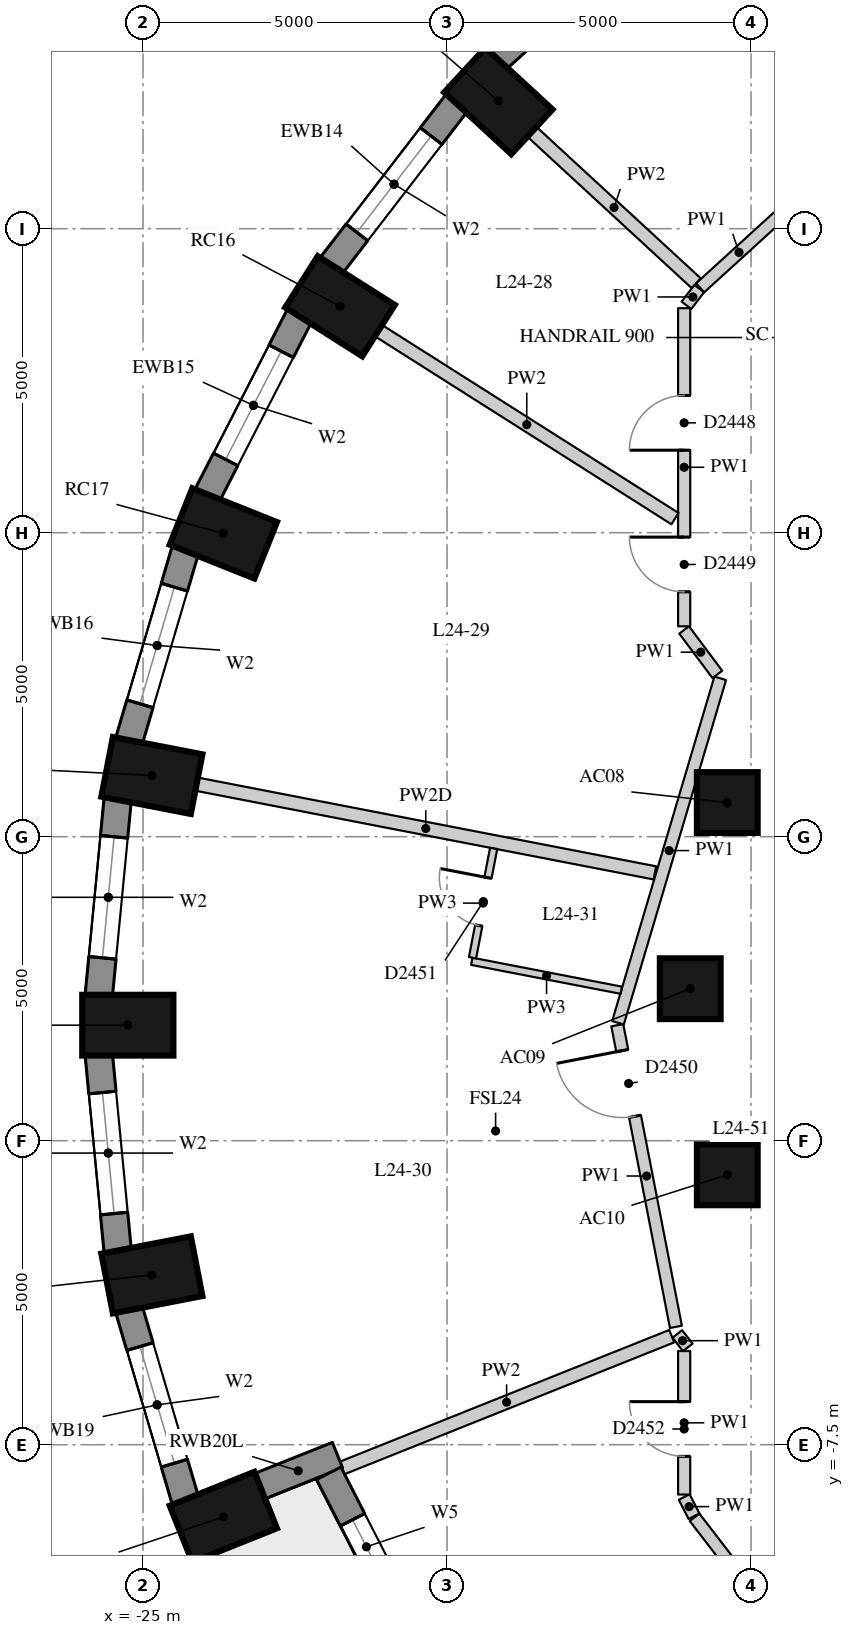
"""IFC4 building model, lengths in metres.
Left out: names, types, materials, properties, quantities, classifications, styles, units other than length and angle.
Written with IfcOpenShell. Run it as: python <this file> out.ifc"""

import sys

from ifc_helpers import new_model, si_unit, direction, frame, frame_2d, origin, origin_2d, place, context, subcontext, project, spatial, rectangle, extrude, element, fill, save


model = new_model("IFC4")
c1 = context("Model", 3, precision=1e-05, world=origin(), true_north=direction((0.0, 1.0)))
c2 = subcontext(c1, "Body", "Model", "MODEL_VIEW")
j1 = project(units=[si_unit("LENGTHUNIT", "METRE"), si_unit("PLANEANGLEUNIT", "RADIAN")], contexts=[c1])
p1 = place(None, origin())
s1 = spatial("IfcSite", under=j1, at=p1, CompositionType="ELEMENT")
p2 = place(p1, origin())
s2 = spatial("IfcBuilding", under=s1, at=p2, CompositionType="ELEMENT")
p3 = place(p2, frame((0.0, 0.0, 88.9)))
s3 = spatial("IfcBuildingStorey", under=s2, at=p3, CompositionType="ELEMENT", Elevation=88.9)
for number, where, z_axis, x_axis in (
    (1, (-19.156, 14.602, 0.0), (0.0, 0.0, 1.0), (-0.735, 0.678, 0.0)),
    (2, (-21.76, 11.225, 0.0), (0.0, 0.0, 1.0), (-0.845, 0.536, 0.0)),
    (3, (-23.679, 7.489, 0.0), (0.0, 0.0, 1.0), (-0.929, 0.371, 0.0)),
    (4, (-24.854, 3.507, 0.0), (0.0, 0.0, 1.0), (-0.982, 0.19, 0.0)),
    (5, (-25.25, -0.6, 0.0), (0.0, 0.0, 1.0), (-1.0, 0.0, 0.0)),
    (6, (-24.854, -4.707, 0.0), (0.0, 0.0, 1.0), (-0.982, -0.19, 0.0)),
    (7, (-23.679, -8.689, 0.0), (0.0, 0.0, 1.0), (-0.929, -0.371, 0.0)),
):
    element("IfcColumn", number, at=place(p3, frame(where, z_axis=z_axis, x_axis=x_axis)), inside=s3, PredefinedType="COLUMN", context=c2, shape_type="SweptSolid", body=[
        extrude(rectangle(XDim=1.5, YDim=1.0, at=origin_2d()), origin(), (0.0, 0.0, 1.0), 3.3),
    ])
for number, where, z_axis, x_axis in (
    (8, (-15.391, 3.062, 0.0), (0.0, 0.0, 1.0), (1.0, 0.0, 0.0)),
    (9, (-16.0, 0.0, 0.0), (0.0, 0.0, 1.0), (1.0, 0.0, 0.0)),
    (10, (-15.391, -3.062, 0.0), (0.0, 0.0, 1.0), (1.0, 0.0, 0.0)),
):
    element("IfcColumn", number, at=place(p3, frame(where, z_axis=z_axis, x_axis=x_axis)), inside=s3, PredefinedType="COLUMN", context=c2, shape_type="SweptSolid", body=[
        extrude(rectangle(XDim=1.0, YDim=1.0, at=origin_2d()), origin(), (0.0, 0.0, 1.0), 3.3),
    ])
p4 = place(p3, frame((-16.62, 17.61, 0.0), z_axis=(0.0, 0.0, 1.0), x_axis=(-0.74032902847, -0.672244694739, 0.0)))
e11 = element("IfcWall", 11, at=p4, inside=s3, PredefinedType="SOLIDWALL", context=c2, shape_type="SweptSolid", body=[
    extrude(rectangle(XDim=3.464, YDim=0.45, at=frame_2d((1.732, 0.0))), origin(), (0.0, 0.0, 1.0), 3.02),
])
p5 = place(p4, frame((0.732, 0.0, 0.4)))
e12 = element("IfcOpeningElement", 12, at=p5, cuts=e11, PredefinedType="OPENING", context=c2, shape_type="SweptSolid", body=[
    extrude(rectangle(XDim=2.0, YDim=1.75, at=frame_2d((1.0, 0.875))), frame((0.0, 0.235, 0.0), z_axis=(0.0, -1.0, 0.0), x_axis=(1.0, 0.0, 0.0)), (0.0, 0.0, 1.0), 0.47),
])
p6 = place(p3, frame((-19.835, 14.575, 0.0), z_axis=(0.0, 0.0, 1.0), x_axis=(-0.610693945156, -0.791866721961, 0.0)))
e13 = element("IfcWall", 13, at=p6, inside=s3, PredefinedType="SOLIDWALL", context=c2, shape_type="SweptSolid", body=[
    extrude(rectangle(XDim=3.395, YDim=0.45, at=frame_2d((1.697, 0.0))), origin(), (0.0, 0.0, 1.0), 3.02),
])
p7 = place(p6, frame((0.697, 0.0, 0.4)))
e14 = element("IfcOpeningElement", 14, at=p7, cuts=e13, PredefinedType="OPENING", context=c2, shape_type="SweptSolid", body=[
    extrude(rectangle(XDim=2.0, YDim=1.75, at=frame_2d((1.0, 0.875))), frame((0.0, 0.235, 0.0), z_axis=(0.0, -1.0, 0.0), x_axis=(1.0, 0.0, 0.0)), (0.0, 0.0, 1.0), 0.47),
])
p8 = place(p3, frame((-22.423, 11.077, 0.0), z_axis=(0.0, 0.0, 1.0), x_axis=(-0.456828186229, -0.889554949549, 0.0)))
e15 = element("IfcWall", 15, at=p8, inside=s3, PredefinedType="SOLIDWALL", context=c2, shape_type="SweptSolid", body=[
    extrude(rectangle(XDim=3.333, YDim=0.45, at=frame_2d((1.667, 0.0))), origin(), (0.0, 0.0, 1.0), 3.02),
])
p9 = place(p8, frame((0.666, 0.0, 0.4)))
e16 = element("IfcOpeningElement", 16, at=p9, cuts=e15, PredefinedType="OPENING", context=c2, shape_type="SweptSolid", body=[
    extrude(rectangle(XDim=2.0, YDim=1.75, at=frame_2d((1.0, 0.875))), frame((0.0, 0.235, 0.0), z_axis=(0.0, -1.0, 0.0), x_axis=(1.0, 0.0, 0.0)), (0.0, 0.0, 1.0), 0.47),
])
p10 = place(p3, frame((-24.302, 7.221, 0.0), z_axis=(0.0, 0.0, 1.0), x_axis=(-0.283071248438, -0.959098883488, 0.0)))
e17 = element("IfcWall", 17, at=p10, inside=s3, PredefinedType="SOLIDWALL", context=c2, shape_type="SweptSolid", body=[
    extrude(rectangle(XDim=3.286, YDim=0.45, at=frame_2d((1.643, 0.0))), origin(), (0.0, 0.0, 1.0), 3.02),
])
p11 = place(p10, frame((0.643, 0.0, 0.4)))
e18 = element("IfcOpeningElement", 18, at=p11, cuts=e17, PredefinedType="OPENING", context=c2, shape_type="SweptSolid", body=[
    extrude(rectangle(XDim=2.0, YDim=1.75, at=frame_2d((1.0, 0.875))), frame((0.0, 0.235, 0.0), z_axis=(0.0, -1.0, 0.0), x_axis=(1.0, 0.0, 0.0)), (0.0, 0.0, 1.0), 0.47),
])
p12 = place(p3, frame((-25.415, 3.126, 0.0), z_axis=(0.0, 0.0, 1.0), x_axis=(-0.095967726544, -0.995384446062, 0.0)))
e19 = element("IfcWall", 19, at=p12, inside=s3, PredefinedType="SOLIDWALL", context=c2, shape_type="SweptSolid", body=[
    extrude(rectangle(XDim=3.261, YDim=0.45, at=frame_2d((1.631, 0.0))), origin(), (0.0, 0.0, 1.0), 3.02),
])
p13 = place(p12, frame((0.631, 0.0, 0.4)))
e20 = element("IfcOpeningElement", 20, at=p13, cuts=e19, PredefinedType="OPENING", context=c2, shape_type="SweptSolid", body=[
    extrude(rectangle(XDim=2.0, YDim=1.75, at=frame_2d((1.0, 0.875))), frame((0.0, 0.235, 0.0), z_axis=(0.0, -1.0, 0.0), x_axis=(1.0, 0.0, 0.0)), (0.0, 0.0, 1.0), 0.47),
])
p14 = place(p3, frame((-25.728, -1.08, 0.0), z_axis=(0.0, 0.0, 1.0), x_axis=(0.095967726544, -0.995384446062, 0.0)))
e21 = element("IfcWall", 21, at=p14, inside=s3, PredefinedType="SOLIDWALL", context=c2, shape_type="SweptSolid", body=[
    extrude(rectangle(XDim=3.261, YDim=0.45, at=frame_2d((1.631, 0.0))), origin(), (0.0, 0.0, 1.0), 3.02),
])
p15 = place(p14, frame((0.631, 0.0, 0.4)))
e22 = element("IfcOpeningElement", 22, at=p15, cuts=e21, PredefinedType="OPENING", context=c2, shape_type="SweptSolid", body=[
    extrude(rectangle(XDim=2.0, YDim=1.75, at=frame_2d((1.0, 0.875))), frame((0.0, 0.235, 0.0), z_axis=(0.0, -1.0, 0.0), x_axis=(1.0, 0.0, 0.0)), (0.0, 0.0, 1.0), 0.47),
])
p16 = place(p3, frame((-25.232, -5.269, 0.0), z_axis=(0.0, 0.0, 1.0), x_axis=(0.283051078697, -0.959104836214, 0.0)))
e23 = element("IfcWall", 23, at=p16, inside=s3, PredefinedType="SOLIDWALL", context=c2, shape_type="SweptSolid", body=[
    extrude(rectangle(XDim=3.286, YDim=0.45, at=frame_2d((1.643, 0.0))), origin(), (0.0, 0.0, 1.0), 3.02),
])
p17 = place(p16, frame((0.643, 0.0, 0.4)))
e24 = element("IfcOpeningElement", 24, at=p17, cuts=e23, PredefinedType="OPENING", context=c2, shape_type="SweptSolid", body=[
    extrude(rectangle(XDim=2.0, YDim=1.75, at=frame_2d((1.0, 0.875))), frame((0.0, 0.235, 0.0), z_axis=(0.0, -1.0, 0.0), x_axis=(1.0, 0.0, 0.0)), (0.0, 0.0, 1.0), 0.47),
])
p18 = place(p3, frame((-23.093, -8.187, 0.0), z_axis=(0.0, 0.0, 1.0), x_axis=(0.928549333349, 0.371209018665, 0.0)))
e25 = element("IfcWall", 25, at=p18, inside=s3, PredefinedType="SOLIDWALL", context=c2, shape_type="SweptSolid", body=[
    extrude(rectangle(XDim=1.39, YDim=0.45, at=frame_2d((0.695, 0.0))), origin(), (0.0, 0.0, 1.0), 3.02),
])
p19 = place(p3, frame((-21.945, -7.97, 0.0), z_axis=(0.0, 0.0, 1.0), x_axis=(0.455905146579, -0.89002836883, 0.0)))
e26 = element("IfcWall", 26, at=p19, inside=s3, PredefinedType="SOLIDWALL", context=c2, shape_type="SweptSolid", body=[
    extrude(rectangle(XDim=3.867, YDim=0.45, at=frame_2d((1.934, 0.0))), origin(), (0.0, 0.0, 1.0), 3.02),
])
p20 = place(p19, frame((0.858, 0.0, 0.4)))
e27 = element("IfcOpeningElement", 27, at=p20, cuts=e26, PredefinedType="OPENING", context=c2, shape_type="SweptSolid", body=[
    extrude(rectangle(XDim=1.0, YDim=1.75, at=frame_2d((0.5, 0.875))), frame((0.0, 0.235, 0.0), z_axis=(0.0, -1.0, 0.0), x_axis=(1.0, 0.0, 0.0)), (0.0, 0.0, 1.0), 0.47),
])
p21 = place(p19, frame((2.009, 0.0, 0.0)))
e28 = element("IfcOpeningElement", 28, at=p21, cuts=e26, PredefinedType="OPENING", context=c2, shape_type="SweptSolid", body=[
    extrude(rectangle(XDim=1.0, YDim=2.15, at=frame_2d((0.5, 1.075))), frame((0.0, 0.235, 0.0), z_axis=(0.0, -1.0, 0.0), x_axis=(1.0, 0.0, 0.0)), (0.0, 0.0, 1.0), 0.47),
])
p22 = place(p3, frame((-14.573, -10.456, 0.0), z_axis=(0.0, 0.0, 1.0), x_axis=(-0.60967360535, 0.792652568872, 0.0)))
e29 = element("IfcWall", 29, at=p22, inside=s3, PredefinedType="PARTITIONING", context=c2, shape_type="SweptSolid", body=[
    extrude(rectangle(XDim=2.223, YDim=0.2, at=frame_2d((1.111, 0.0))), origin(), (0.0, 0.0, 1.0), 3.02),
])
p23 = place(p3, frame((-15.938, -8.676, 0.0), z_axis=(0.0, 0.0, 1.0), x_axis=(-0.456525695549, 0.889710227717, 0.0)))
e30 = element("IfcWall", 30, at=p23, inside=s3, PredefinedType="PARTITIONING", context=c2, shape_type="SweptSolid", body=[
    extrude(rectangle(XDim=0.356, YDim=0.2, at=frame_2d((0.178, 0.0))), origin(), (0.0, 0.0, 1.0), 3.02),
])
p24 = place(p3, frame((-16.1, -8.32, 0.0), z_axis=(0.0, 0.0, 1.0), x_axis=(0.0, 1.0, 0.0)))
e31 = element("IfcWall", 31, at=p24, inside=s3, PredefinedType="PARTITIONING", context=c2, shape_type="SweptSolid", body=[
    extrude(rectangle(XDim=2.36, YDim=0.2, at=frame_2d((1.18, 0.0))), origin(), (0.0, 0.0, 1.0), 3.02),
])
p25 = place(p24, frame((0.628, 0.0, 0.0)))
e32 = element("IfcOpeningElement", 32, at=p25, cuts=e31, PredefinedType="OPENING", context=c2, shape_type="SweptSolid", body=[
    extrude(rectangle(XDim=0.9, YDim=2.1, at=frame_2d((0.45, 1.05))), frame((0.0, 0.11, 0.0), z_axis=(0.0, -1.0, 0.0), x_axis=(1.0, 0.0, 0.0)), (0.0, 0.0, 1.0), 0.22),
])
p26 = place(p3, frame((-16.041, -5.9, 0.0), z_axis=(0.0, 0.0, 1.0), x_axis=(-0.612489897904, 0.790478415243, 0.0)))
e33 = element("IfcWall", 33, at=p26, inside=s3, PredefinedType="PARTITIONING", context=c2, shape_type="SweptSolid", body=[
    extrude(rectangle(XDim=0.28, YDim=0.2, at=frame_2d((0.14, 0.0))), origin(), (0.0, 0.0, 1.0), 3.02),
])
p27 = place(p3, frame((-16.236, -5.562, 0.0), z_axis=(0.0, 0.0, 1.0), x_axis=(-0.190753296708, 0.981638008532, 0.0)))
e34 = element("IfcWall", 34, at=p27, inside=s3, PredefinedType="PARTITIONING", context=c2, shape_type="SweptSolid", body=[
    extrude(rectangle(XDim=5.054, YDim=0.2, at=frame_2d((2.527, 0.0))), origin(), (0.0, 0.0, 1.0), 3.02),
])
p28 = place(p27, frame((3.528, 0.0, 0.0)))
e35 = element("IfcOpeningElement", 35, at=p28, cuts=e34, PredefinedType="OPENING", context=c2, shape_type="SweptSolid", body=[
    extrude(rectangle(XDim=1.1, YDim=2.1, at=frame_2d((0.55, 1.05))), frame((0.0, 0.11, 0.0), z_axis=(0.0, -1.0, 0.0), x_axis=(1.0, 0.0, 0.0)), (0.0, 0.0, 1.0), 0.22),
])
p29 = place(p3, frame((-17.189, -0.562, 0.0), z_axis=(0.0, 0.0, 1.0), x_axis=(0.28454253649, 0.95866341587, 0.0)))
e36 = element("IfcWall", 36, at=p29, inside=s3, PredefinedType="PARTITIONING", context=c2, shape_type="SweptSolid", body=[
    extrude(rectangle(XDim=5.911, YDim=0.2, at=frame_2d((2.956, 0.0))), origin(), (0.0, 0.0, 1.0), 3.02),
])
p30 = place(p3, frame((-15.555, 5.169, 0.0), z_axis=(0.0, 0.0, 1.0), x_axis=(-0.598284647233, 0.801283645712, 0.0)))
e37 = element("IfcWall", 37, at=p30, inside=s3, PredefinedType="PARTITIONING", context=c2, shape_type="SweptSolid", body=[
    extrude(rectangle(XDim=0.912, YDim=0.2, at=frame_2d((0.456, 0.0))), origin(), (0.0, 0.0, 1.0), 3.02),
])
p31 = place(p3, frame((-16.1, 5.96, 0.0), z_axis=(0.0, 0.0, 1.0), x_axis=(0.0, 1.0, 0.0)))
e38 = element("IfcWall", 38, at=p31, inside=s3, PredefinedType="PARTITIONING", context=c2, shape_type="SweptSolid", body=[
    extrude(rectangle(XDim=5.232, YDim=0.2, at=frame_2d((2.616, 0.0))), origin(), (0.0, 0.0, 1.0), 3.02),
])
p32 = place(p31, frame((2.897, 0.0, 0.0)))
e39 = element("IfcOpeningElement", 39, at=p32, cuts=e38, PredefinedType="OPENING", context=c2, shape_type="SweptSolid", body=[
    extrude(rectangle(XDim=0.9, YDim=2.1, at=frame_2d((0.45, 1.05))), frame((0.0, 0.11, 0.0), z_axis=(0.0, -1.0, 0.0), x_axis=(1.0, 0.0, 0.0)), (0.0, 0.0, 1.0), 0.22),
])
p33 = place(p31, frame((0.568, 0.0, 0.0)))
e40 = element("IfcOpeningElement", 40, at=p33, cuts=e38, PredefinedType="OPENING", context=c2, shape_type="SweptSolid", body=[
    extrude(rectangle(XDim=0.9, YDim=2.1, at=frame_2d((0.45, 1.05))), frame((0.0, 0.11, 0.0), z_axis=(0.0, -1.0, 0.0), x_axis=(1.0, 0.0, 0.0)), (0.0, 0.0, 1.0), 0.22),
])
p34 = place(p3, frame((-16.063, 11.24, 0.0), z_axis=(0.0, 0.0, 1.0), x_axis=(0.609744747854, 0.792597844096, 0.0)))
e41 = element("IfcWall", 41, at=p34, inside=s3, PredefinedType="PARTITIONING", context=c2, shape_type="SweptSolid", body=[
    extrude(rectangle(XDim=0.347, YDim=0.2, at=frame_2d((0.174, 0.0))), origin(), (0.0, 0.0, 1.0), 3.02),
])
p35 = place(p3, frame((-15.837, 11.528, 0.0), z_axis=(0.0, 0.0, 1.0), x_axis=(0.739402681643, 0.673263450946, 0.0)))
e42 = element("IfcWall", 42, at=p35, inside=s3, PredefinedType="PARTITIONING", context=c2, shape_type="SweptSolid", body=[
    extrude(rectangle(XDim=1.728, YDim=0.2, at=frame_2d((0.864, 0.0))), origin(), (0.0, 0.0, 1.0), 3.02),
])
p36 = place(p3, frame((-18.604, 14.094, 0.0), z_axis=(0.0, 0.0, 1.0), x_axis=(0.73529495628, -0.677747244383, 0.0)))
e43 = element("IfcWall", 43, at=p36, inside=s3, PredefinedType="PARTITIONING", context=c2, shape_type="SweptSolid", body=[
    extrude(rectangle(XDim=3.674, YDim=0.22, at=frame_2d((1.837, 0.0))), origin(), (0.0, 0.0, 1.0), 3.02),
])
p37 = place(p3, frame((-21.126, 10.823, 0.0), z_axis=(0.0, 0.0, 1.0), x_axis=(0.844518840625, -0.535525842355, 0.0)))
e44 = element("IfcWall", 44, at=p37, inside=s3, PredefinedType="PARTITIONING", context=c2, shape_type="SweptSolid", body=[
    extrude(rectangle(XDim=5.773, YDim=0.22, at=frame_2d((2.887, 0.0))), origin(), (0.0, 0.0, 1.0), 3.02),
])
p38 = place(p3, frame((-24.118, 3.364, 0.0), z_axis=(0.0, 0.0, 1.0), x_axis=(0.981759939745, -0.19012475039, 0.0)))
e45 = element("IfcWall", 45, at=p38, inside=s3, PredefinedType="PARTITIONING", context=c2, shape_type="SweptSolid", body=[
    extrude(rectangle(XDim=7.677, YDim=0.22, at=frame_2d((3.838, 0.0))), origin(), (0.0, 0.0, 1.0), 2.47),
])
p39 = place(p3, frame((-21.736, -7.887, 0.0), z_axis=(0.0, 0.0, 1.0), x_axis=(0.928522746632, 0.371275516277, 0.0)))
e46 = element("IfcWall", 46, at=p39, inside=s3, PredefinedType="PARTITIONING", context=c2, shape_type="SweptSolid", body=[
    extrude(rectangle(XDim=5.848, YDim=0.22, at=frame_2d((2.924, 0.0))), origin(), (0.0, 0.0, 1.0), 3.02),
])
p40 = place(p3, frame((-17.134, -0.026, 0.0), z_axis=(0.0, 0.0, 1.0), x_axis=(-0.98174757037, 0.190188611835, 0.0)))
e47 = element("IfcWall", 47, at=p40, inside=s3, PredefinedType="PARTITIONING", context=c2, shape_type="SweptSolid", body=[
    extrude(rectangle(XDim=2.504, YDim=0.12, at=frame_2d((1.252, 0.0))), origin(), (0.0, 0.0, 1.0), 3.02),
])
p41 = place(p3, frame((-19.581, 0.509, 0.0), z_axis=(0.0, 0.0, 1.0), x_axis=(0.189826955452, 0.981817562984, 0.0)))
e48 = element("IfcWall", 48, at=p41, inside=s3, PredefinedType="PARTITIONING", context=c2, shape_type="SweptSolid", body=[
    extrude(rectangle(XDim=1.83, YDim=0.12, at=frame_2d((0.915, 0.0))), origin(), (0.0, 0.0, 1.0), 3.02),
])
p42 = place(p41, frame((0.54, 0.0, 0.0)))
e49 = element("IfcOpeningElement", 49, at=p42, cuts=e48, PredefinedType="OPENING", context=c2, shape_type="SweptSolid", body=[
    extrude(rectangle(XDim=0.8, YDim=2.1, at=frame_2d((0.4, 1.05))), frame((0.0, 0.07, 0.0), z_axis=(0.0, -1.0, 0.0), x_axis=(1.0, 0.0, 0.0)), (0.0, 0.0, 1.0), 0.14),
])
p43 = place(p7, origin())
e50 = element("IfcWindow", 50, at=p43, inside=s3, PartitioningType="SINGLE_PANEL", PredefinedType="WINDOW", context=c2, shape_type="SweptSolid", body=[
    extrude(rectangle(XDim=2.0, YDim=1.75, at=frame_2d((1.0, 0.875))), frame((0.0, 0.035, 0.0), z_axis=(0.0, -1.0, 0.0), x_axis=(1.0, 0.0, 0.0)), (0.0, 0.0, 1.0), 0.06),
])
fill(e14, e50)
p44 = place(p9, origin())
e51 = element("IfcWindow", 51, at=p44, inside=s3, PartitioningType="SINGLE_PANEL", PredefinedType="WINDOW", context=c2, shape_type="SweptSolid", body=[
    extrude(rectangle(XDim=2.0, YDim=1.75, at=frame_2d((1.0, 0.875))), frame((0.0, 0.035, 0.0), z_axis=(0.0, -1.0, 0.0), x_axis=(1.0, 0.0, 0.0)), (0.0, 0.0, 1.0), 0.06),
])
fill(e16, e51)
p45 = place(p11, origin())
e52 = element("IfcWindow", 52, at=p45, inside=s3, PartitioningType="SINGLE_PANEL", PredefinedType="WINDOW", context=c2, shape_type="SweptSolid", body=[
    extrude(rectangle(XDim=2.0, YDim=1.75, at=frame_2d((1.0, 0.875))), frame((0.0, 0.035, 0.0), z_axis=(0.0, -1.0, 0.0), x_axis=(1.0, 0.0, 0.0)), (0.0, 0.0, 1.0), 0.06),
])
fill(e18, e52)
p46 = place(p13, origin())
e53 = element("IfcWindow", 53, at=p46, inside=s3, PartitioningType="SINGLE_PANEL", PredefinedType="WINDOW", context=c2, shape_type="SweptSolid", body=[
    extrude(rectangle(XDim=2.0, YDim=1.75, at=frame_2d((1.0, 0.875))), frame((0.0, 0.035, 0.0), z_axis=(0.0, -1.0, 0.0), x_axis=(1.0, 0.0, 0.0)), (0.0, 0.0, 1.0), 0.06),
])
fill(e20, e53)
p47 = place(p15, origin())
e54 = element("IfcWindow", 54, at=p47, inside=s3, PartitioningType="SINGLE_PANEL", PredefinedType="WINDOW", context=c2, shape_type="SweptSolid", body=[
    extrude(rectangle(XDim=2.0, YDim=1.75, at=frame_2d((1.0, 0.875))), frame((0.0, 0.035, 0.0), z_axis=(0.0, -1.0, 0.0), x_axis=(1.0, 0.0, 0.0)), (0.0, 0.0, 1.0), 0.06),
])
fill(e22, e54)
p48 = place(p17, origin())
e55 = element("IfcWindow", 55, at=p48, inside=s3, PartitioningType="SINGLE_PANEL", PredefinedType="WINDOW", context=c2, shape_type="SweptSolid", body=[
    extrude(rectangle(XDim=2.0, YDim=1.75, at=frame_2d((1.0, 0.875))), frame((0.0, 0.035, 0.0), z_axis=(0.0, -1.0, 0.0), x_axis=(1.0, 0.0, 0.0)), (0.0, 0.0, 1.0), 0.06),
])
fill(e24, e55)
p49 = place(p20, origin())
e56 = element("IfcWindow", 56, at=p49, inside=s3, PartitioningType="SINGLE_PANEL", PredefinedType="WINDOW", context=c2, shape_type="SweptSolid", body=[
    extrude(rectangle(XDim=1.0, YDim=1.75, at=frame_2d((0.5, 0.875))), frame((0.0, 0.035, 0.0), z_axis=(0.0, -1.0, 0.0), x_axis=(1.0, 0.0, 0.0)), (0.0, 0.0, 1.0), 0.06),
])
fill(e27, e56)
p50 = place(p32, origin())
e57 = element("IfcDoor", 57, at=p50, inside=s3, OperationType="SINGLE_SWING_LEFT", PredefinedType="DOOR", context=c2, shape_type="SweptSolid", body=[
    extrude(rectangle(XDim=0.9, YDim=2.1, at=frame_2d((0.45, 1.05))), frame((0.0, 0.025, 0.0), z_axis=(0.0, -1.0, 0.0), x_axis=(1.0, 0.0, 0.0)), (0.0, 0.0, 1.0), 0.05),
])
fill(e39, e57)
p51 = place(p33, origin())
e58 = element("IfcDoor", 58, at=p51, inside=s3, OperationType="SINGLE_SWING_RIGHT", PredefinedType="DOOR", context=c2, shape_type="SweptSolid", body=[
    extrude(rectangle(XDim=0.9, YDim=2.1, at=frame_2d((0.45, 1.05))), frame((0.0, 0.025, 0.0), z_axis=(0.0, -1.0, 0.0), x_axis=(1.0, 0.0, 0.0)), (0.0, 0.0, 1.0), 0.05),
])
fill(e40, e58)
p52 = place(p28, origin())
e59 = element("IfcDoor", 59, at=p52, inside=s3, OperationType="SINGLE_SWING_RIGHT", PredefinedType="DOOR", context=c2, shape_type="SweptSolid", body=[
    extrude(rectangle(XDim=1.1, YDim=2.1, at=frame_2d((0.55, 1.05))), frame((0.0, 0.025, 0.0), z_axis=(0.0, -1.0, 0.0), x_axis=(1.0, 0.0, 0.0)), (0.0, 0.0, 1.0), 0.05),
])
fill(e35, e59)
p53 = place(p42, origin())
e60 = element("IfcDoor", 60, at=p53, inside=s3, OperationType="SINGLE_SWING_RIGHT", PredefinedType="DOOR", context=c2, shape_type="SweptSolid", body=[
    extrude(rectangle(XDim=0.8, YDim=2.1, at=frame_2d((0.4, 1.05))), frame((0.0, 0.025, 0.0), z_axis=(0.0, -1.0, 0.0), x_axis=(1.0, 0.0, 0.0)), (0.0, 0.0, 1.0), 0.05),
])
fill(e49, e60)
p54 = place(p25, origin())
e61 = element("IfcDoor", 61, at=p54, inside=s3, OperationType="SINGLE_SWING_RIGHT", PredefinedType="DOOR", context=c2, shape_type="SweptSolid", body=[
    extrude(rectangle(XDim=0.9, YDim=2.1, at=frame_2d((0.45, 1.05))), frame((0.0, 0.025, 0.0), z_axis=(0.0, -1.0, 0.0), x_axis=(1.0, 0.0, 0.0)), (0.0, 0.0, 1.0), 0.05),
])
fill(e32, e61)
save(model, sys.argv[1])
